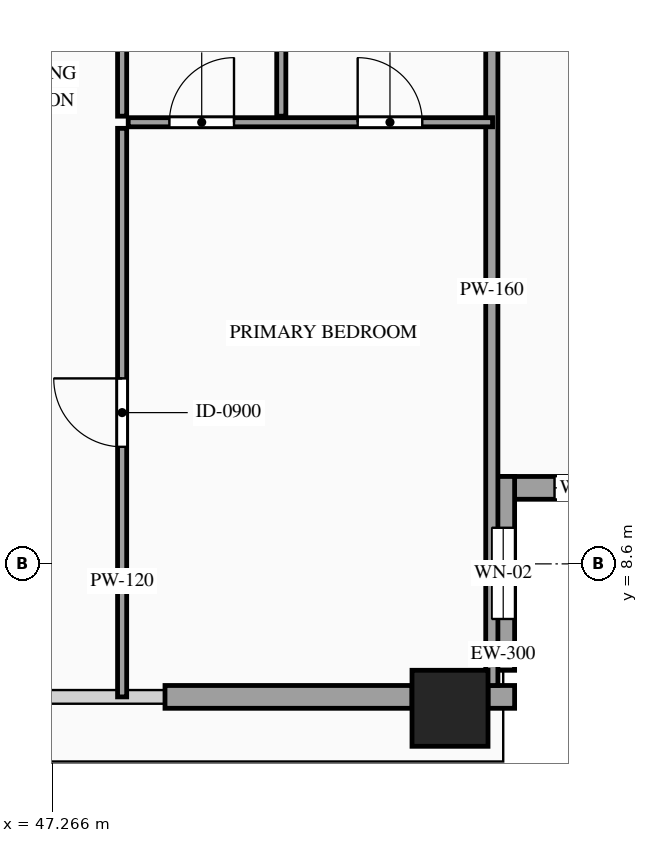
"""IFC4 building model, lengths in metres.
Left out: names, types, materials, properties, quantities, classifications, styles, units other than length and angle.
Written with IfcOpenShell. Run it as: python <this file> out.ifc"""

import sys

from ifc_helpers import new_model, si_unit, direction, frame, frame_2d, origin, origin_2d, place, context, subcontext, project, spatial, rectangle, hollow_rectangle, extrude, source, transform, mapped, element, fill, save


model = new_model("IFC4")
c1 = context("Model", 3, precision=1e-05, world=origin(), true_north=direction((0.0, 1.0)))
c2 = subcontext(c1, "Body", "Model", "MODEL_VIEW")
j1 = project(units=[si_unit("LENGTHUNIT", "METRE"), si_unit("PLANEANGLEUNIT", "RADIAN")], contexts=[c1])
p1 = place(None, origin())
s1 = spatial("IfcSite", under=j1, at=p1, CompositionType="ELEMENT")
p2 = place(p1, origin())
s2 = spatial("IfcBuilding", under=s1, at=p2, CompositionType="ELEMENT")
p3 = place(p2, frame((0.0, 0.0, 328.7)))
s3 = spatial("IfcBuildingStorey", under=s2, at=p3, CompositionType="ELEMENT", Elevation=328.7)
m1 = source(origin(), c2, "Body", "SweptSolid", [
    extrude(hollow_rectangle(XDim=1.0, YDim=1.0, WallThickness=0.048, at=origin_2d()), origin(), (0.0, 0.0, 1.0), 3.5),
])
p4 = place(p3, frame((52.5, 6.7, 0.0), z_axis=(0.0, 0.0, 1.0), x_axis=(1.0, 0.0, 0.0)))
e1 = element("IfcColumn", 1, at=p4, inside=s3, PredefinedType="COLUMN", context=c2, shape_type="MappedRepresentation", body=[
    mapped(m1, transform((0.0, 0.0, 0.0), scale=1.0)),
])
p5 = place(p3, frame((53.05, 9.6, 0.0), z_axis=(0.0, 0.0, 1.0), x_axis=(1.0, 0.0, 0.0)))
e2 = element("IfcWall", 2, at=p5, inside=s3, PredefinedType="SOLIDWALL", context=c2, shape_type="SweptSolid", body=[
    extrude(rectangle(XDim=2.55, YDim=0.3, at=frame_2d((1.275, 0.0))), origin(), (0.0, 0.0, 1.0), 3.28),
])
p6 = place(p5, frame((0.825, 0.0, 0.85)))
e3 = element("IfcOpeningElement", 3, at=p6, cuts=e2, PredefinedType="OPENING", context=c2, shape_type="SweptSolid", body=[
    extrude(rectangle(XDim=0.9, YDim=1.5, at=frame_2d((0.45, 0.75))), frame((0.0, 0.165, 0.0), z_axis=(0.0, -1.0, 0.0), x_axis=(1.0, 0.0, 0.0)), (0.0, 0.0, 1.0), 0.33),
])
p7 = place(p3, frame((53.2, 7.2, 0.0), z_axis=(0.0, 0.0, 1.0), x_axis=(0.0, 1.0, 0.0)))
e4 = element("IfcWall", 4, at=p7, inside=s3, PredefinedType="SOLIDWALL", context=c2, shape_type="SweptSolid", body=[
    extrude(rectangle(XDim=2.55, YDim=0.3, at=frame_2d((1.275, 0.0))), origin(), (0.0, 0.0, 1.0), 3.28),
])
p8 = place(p7, frame((0.675, 0.0, 0.85)))
e5 = element("IfcOpeningElement", 5, at=p8, cuts=e4, PredefinedType="OPENING", context=c2, shape_type="SweptSolid", body=[
    extrude(rectangle(XDim=1.2, YDim=2.1, at=frame_2d((0.6, 1.05))), frame((0.0, 0.165, 0.0), z_axis=(0.0, -1.0, 0.0), x_axis=(1.0, 0.0, 0.0)), (0.0, 0.0, 1.0), 0.33),
])
m2 = source(origin(), c2, "Body", "SweptSolid", [
    extrude(rectangle(XDim=0.35, YDim=0.3, at=frame_2d((0.175, 0.0))), origin(), (0.0, 0.0, 1.0), 3.28),
])
p9 = place(p3, frame((53.0, 6.85, 0.0), z_axis=(0.0, 0.0, 1.0), x_axis=(1.0, 0.0, 0.0)))
e6 = element("IfcWall", 6, at=p9, inside=s3, PredefinedType="SOLIDWALL", context=c2, shape_type="MappedRepresentation", body=[
    mapped(m2, transform((0.0, 0.0, 0.0), scale=1.0)),
])
m3 = source(origin(), c2, "Body", "SweptSolid", [
    extrude(rectangle(XDim=3.25, YDim=0.3, at=frame_2d((1.625, 0.0))), origin(), (0.0, 0.0, 1.0), 2.885),
])
p10 = place(p3, frame((48.75, 6.85, 0.0), z_axis=(0.0, 0.0, 1.0), x_axis=(1.0, 0.0, 0.0)))
e7 = element("IfcWall", 7, at=p10, inside=s3, PredefinedType="SOLIDWALL", context=c2, shape_type="MappedRepresentation", body=[
    mapped(m3, transform((0.0, 0.0, 0.0), scale=1.0)),
])
m4 = source(origin(), c2, "Body", "SweptSolid", [
    extrude(rectangle(XDim=10.39, YDim=0.16, at=frame_2d((5.195, 0.0))), origin(), (0.0, 0.0, 1.0), 3.28),
])
p11 = place(p3, frame((53.05, 7.0, 0.0), z_axis=(0.0, 0.0, 1.0), x_axis=(0.0, 1.0, 0.0)))
e8 = element("IfcWall", 8, at=p11, inside=s3, PredefinedType="PARTITIONING", context=c2, shape_type="MappedRepresentation", body=[
    mapped(m4, transform((0.0, 0.0, 0.0), scale=1.0)),
])
m5 = source(origin(), c2, "Body", "SweptSolid", [
    extrude(rectangle(XDim=2.9, YDim=0.12, at=frame_2d((1.45, 0.0))), origin(), (0.0, 0.0, 1.0), 2.825),
])
p12 = place(p3, frame((50.28, 14.49, 0.0), z_axis=(0.0, 0.0, 1.0), x_axis=(0.0, 1.0, 0.0)))
e9 = element("IfcWall", 9, at=p12, inside=s3, PredefinedType="PARTITIONING", context=c2, shape_type="MappedRepresentation", body=[
    mapped(m5, transform((0.0, 0.0, 0.0), scale=1.0)),
])
m6 = source(origin(), c2, "Body", "SweptSolid", [
    extrude(rectangle(XDim=2.9, YDim=0.12, at=frame_2d((1.45, 0.0))), origin(), (0.0, 0.0, 1.0), 3.28),
])
p13 = place(p3, frame((48.186, 14.49, 0.0), z_axis=(0.0, 0.0, 1.0), x_axis=(0.0, 1.0, 0.0)))
e10 = element("IfcWall", 10, at=p13, inside=s3, PredefinedType="PARTITIONING", context=c2, shape_type="MappedRepresentation", body=[
    mapped(m6, transform((0.0, 0.0, 0.0), scale=1.0)),
])
p14 = place(p3, frame((48.266, 14.41, 0.0), z_axis=(0.0, 0.0, 1.0), x_axis=(1.0, 0.0, 0.0)))
e11 = element("IfcWall", 11, at=p14, inside=s3, PredefinedType="PARTITIONING", context=c2, shape_type="SweptSolid", body=[
    extrude(rectangle(XDim=4.794, YDim=0.12, at=frame_2d((2.397, 0.0))), origin(), (0.0, 0.0, 1.0), 3.28),
])
p15 = place(p14, frame((3.019, 0.0, 0.0)))
e12 = element("IfcOpeningElement", 12, at=p15, cuts=e11, PredefinedType="OPENING", context=c2, shape_type="SweptSolid", body=[
    extrude(rectangle(XDim=0.85, YDim=2.1, at=frame_2d((0.425, 1.05))), frame((0.0, 0.075, 0.0), z_axis=(0.0, -1.0, 0.0), x_axis=(1.0, 0.0, 0.0)), (0.0, 0.0, 1.0), 0.15),
])
p16 = place(p14, frame((0.542, 0.0, 0.0)))
e13 = element("IfcOpeningElement", 13, at=p16, cuts=e11, PredefinedType="OPENING", context=c2, shape_type="SweptSolid", body=[
    extrude(rectangle(XDim=0.85, YDim=2.1, at=frame_2d((0.425, 1.05))), frame((0.0, 0.075, 0.0), z_axis=(0.0, -1.0, 0.0), x_axis=(1.0, 0.0, 0.0)), (0.0, 0.0, 1.0), 0.15),
])
p17 = place(p3, frame((48.186, 6.85, 0.0), z_axis=(0.0, 0.0, 1.0), x_axis=(0.0, 1.0, 0.0)))
e14 = element("IfcWall", 14, at=p17, inside=s3, PredefinedType="PARTITIONING", context=c2, shape_type="SweptSolid", body=[
    extrude(rectangle(XDim=7.48, YDim=0.12, at=frame_2d((3.74, 0.0))), origin(), (0.0, 0.0, 1.0), 3.28),
])
p18 = place(p17, frame((3.29, 0.0, 0.0)))
e15 = element("IfcOpeningElement", 15, at=p18, cuts=e14, PredefinedType="OPENING", context=c2, shape_type="SweptSolid", body=[
    extrude(rectangle(XDim=0.9, YDim=2.15, at=frame_2d((0.45, 1.075))), frame((0.0, 0.075, 0.0), z_axis=(0.0, -1.0, 0.0), x_axis=(1.0, 0.0, 0.0)), (0.0, 0.0, 1.0), 0.15),
])
m7 = source(origin(), c2, "Body", "SweptSolid", [
    extrude(rectangle(XDim=0.9, YDim=1.5, at=frame_2d((0.45, 0.75))), frame((0.0, 0.03, 0.0), z_axis=(0.0, -1.0, 0.0), x_axis=(1.0, 0.0, 0.0)), (0.0, 0.0, 1.0), 0.06),
])
p19 = place(p6, origin())
e16 = element("IfcWindow", 16, at=p19, inside=s3, PartitioningType="SINGLE_PANEL", PredefinedType="WINDOW", context=c2, shape_type="MappedRepresentation", body=[
    mapped(m7, transform((0.0, 0.0, 0.0), scale=1.0)),
])
fill(e3, e16)
m8 = source(origin(), c2, "Body", "SweptSolid", [
    extrude(rectangle(XDim=1.2, YDim=2.1, at=frame_2d((0.6, 1.05))), frame((0.0, 0.03, 0.0), z_axis=(0.0, -1.0, 0.0), x_axis=(1.0, 0.0, 0.0)), (0.0, 0.0, 1.0), 0.06),
])
p20 = place(p8, origin())
e17 = element("IfcWindow", 17, at=p20, inside=s3, PartitioningType="SINGLE_PANEL", PredefinedType="WINDOW", context=c2, shape_type="MappedRepresentation", body=[
    mapped(m8, transform((0.0, 0.0, 0.0), scale=1.0)),
])
fill(e5, e17)
m9 = source(origin(), c2, "Body", "SweptSolid", [
    extrude(rectangle(XDim=0.85, YDim=2.1, at=frame_2d((0.425, 1.05))), frame((0.0, 0.025, 0.0), z_axis=(0.0, -1.0, 0.0), x_axis=(1.0, 0.0, 0.0)), (0.0, 0.0, 1.0), 0.05),
])
p21 = place(p15, origin())
e18 = element("IfcDoor", 18, at=p21, inside=s3, OperationType="SINGLE_SWING_LEFT", PredefinedType="DOOR", context=c2, shape_type="MappedRepresentation", body=[
    mapped(m9, transform((0.0, 0.0, 0.0), scale=1.0)),
])
fill(e12, e18)
p22 = place(p16, origin())
e19 = element("IfcDoor", 19, at=p22, inside=s3, OperationType="SINGLE_SWING_RIGHT", PredefinedType="DOOR", context=c2, shape_type="MappedRepresentation", body=[
    mapped(m9, transform((0.0, 0.0, 0.0), scale=1.0)),
])
fill(e13, e19)
m10 = source(origin(), c2, "Body", "SweptSolid", [
    extrude(rectangle(XDim=0.9, YDim=2.15, at=frame_2d((0.45, 1.075))), frame((0.0, 0.025, 0.0), z_axis=(0.0, -1.0, 0.0), x_axis=(1.0, 0.0, 0.0)), (0.0, 0.0, 1.0), 0.05),
])
p23 = place(p18, origin())
e20 = element("IfcDoor", 20, at=p23, inside=s3, OperationType="SINGLE_SWING_RIGHT", PredefinedType="DOOR", context=c2, shape_type="MappedRepresentation", body=[
    mapped(m10, transform((0.0, 0.0, 0.0), scale=1.0)),
])
fill(e15, e20)
save(model, sys.argv[1])
